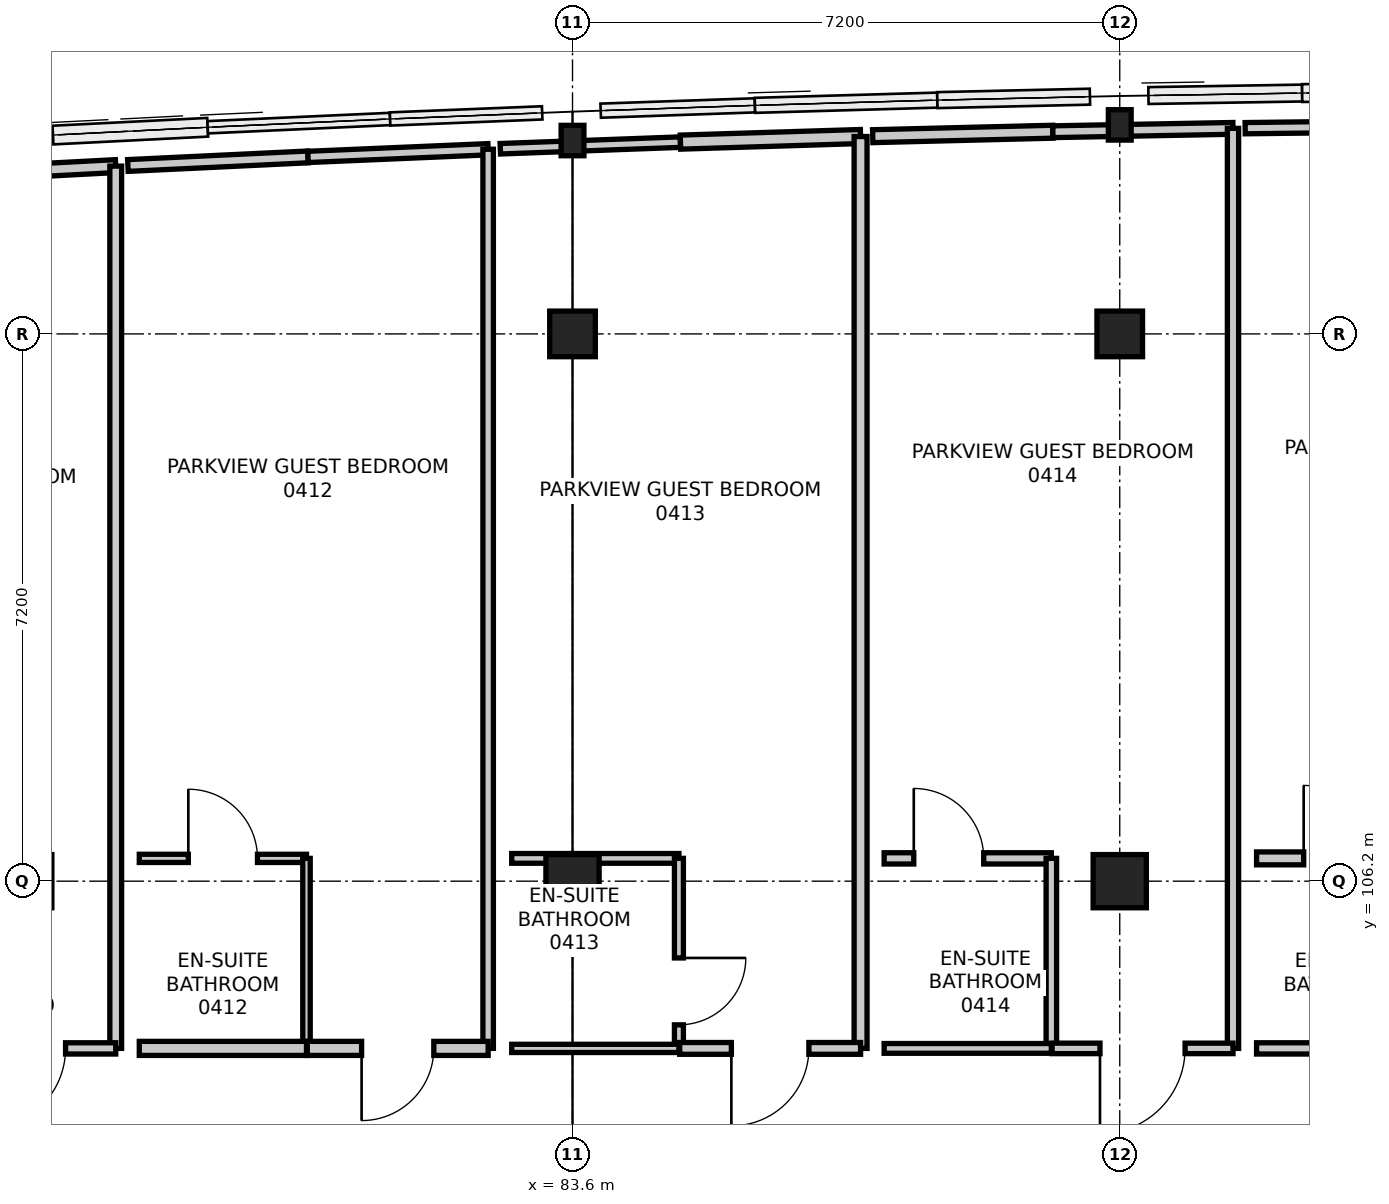
"""IFC4 building model, lengths in metres.
Left out: names, types, materials, properties, quantities, classifications, styles, units other than length and angle.
Written with IfcOpenShell. Run it as: python <this file> out.ifc"""

import sys

from ifc_helpers import new_model, si_unit, direction, frame, frame_2d, origin, origin_2d, place, context, subcontext, project, spatial, rectangle, i_section, extrude, element, fill, save


model = new_model("IFC4")
c1 = context("Model", 3, precision=1e-05, world=origin(), true_north=direction((0.0, 1.0)))
c2 = subcontext(c1, "Body", "Model", "MODEL_VIEW")
j1 = project(units=[si_unit("LENGTHUNIT", "METRE"), si_unit("PLANEANGLEUNIT", "RADIAN")], contexts=[c1])
p1 = place(None, origin())
s1 = spatial("IfcSite", under=j1, at=p1, CompositionType="ELEMENT")
p2 = place(p1, origin())
s2 = spatial("IfcBuilding", under=s1, at=p2, CompositionType="ELEMENT")
p3 = place(p2, frame((0.0, 0.0, 19.2)))
s3 = spatial("IfcBuildingStorey", under=s2, at=p3, CompositionType="ELEMENT", Elevation=19.2)
p4 = place(p3, frame((83.6, 106.2, 0.0), z_axis=(0.0, 0.0, 1.0), x_axis=(1.0, 0.0, 0.0)))
e1 = element("IfcColumn", 1, at=p4, inside=s3, PredefinedType="COLUMN", context=c2, shape_type="SweptSolid", body=[
    extrude(rectangle(XDim=0.7, YDim=0.7, at=origin_2d()), origin(), (0.0, 0.0, 1.0), 3.6),
])
p5 = place(p3, frame((83.6, 113.4, 0.0), z_axis=(0.0, 0.0, 1.0), x_axis=(1.0, 0.0, 0.0)))
e2 = element("IfcColumn", 2, at=p5, inside=s3, PredefinedType="COLUMN", context=c2, shape_type="SweptSolid", body=[
    extrude(rectangle(XDim=0.6, YDim=0.6, at=origin_2d()), origin(), (0.0, 0.0, 1.0), 3.6),
])
p6 = place(p3, frame((83.6, 115.944, 0.0), z_axis=(0.0, 0.0, 1.0), x_axis=(1.0, 0.0, 0.0)))
e3 = element("IfcColumn", 3, at=p6, inside=s3, PredefinedType="COLUMN", context=c2, shape_type="SweptSolid", body=[
    extrude(i_section(OverallWidth=0.3, OverallDepth=0.4, WebThickness=0.013, FlangeThickness=0.024, FilletRadius=0.027, at=origin_2d()), origin(), (0.0, 0.0, 1.0), 3.6),
])
p7 = place(p3, frame((90.8, 106.2, 0.0), z_axis=(0.0, 0.0, 1.0), x_axis=(1.0, 0.0, 0.0)))
e4 = element("IfcColumn", 4, at=p7, inside=s3, PredefinedType="COLUMN", context=c2, shape_type="SweptSolid", body=[
    extrude(rectangle(XDim=0.7, YDim=0.7, at=origin_2d()), origin(), (0.0, 0.0, 1.0), 3.6),
])
p8 = place(p3, frame((90.8, 113.4, 0.0), z_axis=(0.0, 0.0, 1.0), x_axis=(1.0, 0.0, 0.0)))
e5 = element("IfcColumn", 5, at=p8, inside=s3, PredefinedType="COLUMN", context=c2, shape_type="SweptSolid", body=[
    extrude(rectangle(XDim=0.6, YDim=0.6, at=origin_2d()), origin(), (0.0, 0.0, 1.0), 3.6),
])
p9 = place(p3, frame((90.8, 116.15, 0.0), z_axis=(0.0, 0.0, 1.0), x_axis=(1.0, 0.0, 0.0)))
e6 = element("IfcColumn", 6, at=p9, inside=s3, PredefinedType="COLUMN", context=c2, shape_type="SweptSolid", body=[
    extrude(i_section(OverallWidth=0.3, OverallDepth=0.4, WebThickness=0.013, FlangeThickness=0.024, FilletRadius=0.027, at=origin_2d()), origin(), (0.0, 0.0, 1.0), 3.6),
])
p10 = place(p3, frame((75.22, 115.483, 0.0), z_axis=(0.0, 0.0, 1.0), x_axis=(0.998622939487, 0.052461650097, 0.0)))
e7 = element("IfcWall", 7, at=p10, inside=s3, PredefinedType="PARTITIONING", context=c2, shape_type="SweptSolid", body=[
    extrude(rectangle(XDim=2.373, YDim=0.17, at=frame_2d((1.187, 0.0))), origin(), (0.0, 0.0, 1.0), 2.926),
])
p11 = place(p3, frame((77.59, 115.607, 0.0), z_axis=(0.0, 0.0, 1.0), x_axis=(0.0, -1.0, 0.0)))
e8 = element("IfcWall", 8, at=p11, inside=s3, PredefinedType="PARTITIONING", context=c2, shape_type="SweptSolid", body=[
    extrude(rectangle(XDim=11.607, YDim=0.155, at=frame_2d((5.804, 0.0))), origin(), (0.0, 0.0, 1.0), 2.735),
])
p12 = place(p3, frame((77.59, 104.0, 0.0), z_axis=(0.0, 0.0, 1.0), x_axis=(-1.0, 0.0, 0.0)))
e9 = element("IfcWall", 9, at=p12, inside=s3, PredefinedType="PARTITIONING", context=c2, shape_type="SweptSolid", body=[
    extrude(rectangle(XDim=2.38, YDim=0.148, at=frame_2d((1.19, 0.0))), origin(), (0.0, 0.0, 1.0), 2.685),
])
p13 = place(p12, frame((0.66, 0.0, 0.0)))
e10 = element("IfcOpeningElement", 10, at=p13, cuts=e9, PredefinedType="OPENING", context=c2, shape_type="SweptSolid", body=[
    extrude(rectangle(XDim=1.06, YDim=2.2, at=frame_2d((0.53, 1.1))), frame((0.0, 0.084, 0.0), z_axis=(0.0, -1.0, 0.0), x_axis=(1.0, 0.0, 0.0)), (0.0, 0.0, 1.0), 0.168),
])
p14 = place(p3, frame((77.9, 106.5, 0.0), z_axis=(0.0, 0.0, 1.0), x_axis=(1.0, 0.0, 0.0)))
e11 = element("IfcWall", 11, at=p14, inside=s3, PredefinedType="PARTITIONING", context=c2, shape_type="SweptSolid", body=[
    extrude(rectangle(XDim=2.2, YDim=0.108, at=frame_2d((1.1, 0.0))), origin(), (0.0, 0.0, 1.0), 3.35),
])
p15 = place(p14, frame((0.645, 0.0, 0.0)))
e12 = element("IfcOpeningElement", 12, at=p15, cuts=e11, PredefinedType="OPENING", context=c2, shape_type="SweptSolid", body=[
    extrude(rectangle(XDim=0.91, YDim=2.11, at=frame_2d((0.455, 1.055))), frame((0.0, 0.064, 0.0), z_axis=(0.0, -1.0, 0.0), x_axis=(1.0, 0.0, 0.0)), (0.0, 0.0, 1.0), 0.128),
])
p16 = place(p3, frame((80.1, 106.5, 0.0), z_axis=(0.0, 0.0, 1.0), x_axis=(0.0, -1.0, 0.0)))
e13 = element("IfcWall", 13, at=p16, inside=s3, PredefinedType="PARTITIONING", context=c2, shape_type="SweptSolid", body=[
    extrude(rectangle(XDim=2.5, YDim=0.098, at=frame_2d((1.25, 0.0))), origin(), (0.0, 0.0, 1.0), 2.735),
])
p17 = place(p3, frame((80.1, 104.0, 0.0), z_axis=(0.0, 0.0, 1.0), x_axis=(-1.0, 0.0, 0.0)))
e14 = element("IfcWall", 14, at=p17, inside=s3, PredefinedType="PARTITIONING", context=c2, shape_type="SweptSolid", body=[
    extrude(rectangle(XDim=2.2, YDim=0.185, at=frame_2d((1.1, 0.0))), origin(), (0.0, 0.0, 1.0), 3.35),
])
p18 = place(p3, frame((77.75, 115.615, 0.0), z_axis=(0.0, 0.0, 1.0), x_axis=(0.998864643261, 0.047638476497, 0.0)))
e15 = element("IfcWall", 15, at=p18, inside=s3, PredefinedType="PARTITIONING", context=c2, shape_type="SweptSolid", body=[
    extrude(rectangle(XDim=2.373, YDim=0.155, at=frame_2d((1.187, 0.0))), origin(), (0.0, 0.0, 1.0), 2.926),
])
p19 = place(p3, frame((80.12, 115.729, 0.0), z_axis=(0.0, 0.0, 1.0), x_axis=(0.999096119718, 0.042508158797, 0.0)))
e16 = element("IfcWall", 16, at=p19, inside=s3, PredefinedType="PARTITIONING", context=c2, shape_type="SweptSolid", body=[
    extrude(rectangle(XDim=2.372, YDim=0.148, at=frame_2d((1.186, 0.0))), origin(), (0.0, 0.0, 1.0), 2.926),
])
p20 = place(p3, frame((82.49, 115.829, 0.0), z_axis=(0.0, 0.0, 1.0), x_axis=(0.0, -1.0, 0.0)))
e17 = element("IfcWall", 17, at=p20, inside=s3, PredefinedType="PARTITIONING", context=c2, shape_type="SweptSolid", body=[
    extrude(rectangle(XDim=11.829, YDim=0.138, at=frame_2d((5.915, 0.0))), origin(), (0.0, 0.0, 1.0), 2.735),
])
p21 = place(p3, frame((82.49, 104.0, 0.0), z_axis=(0.0, 0.0, 1.0), x_axis=(-1.0, 0.0, 0.0)))
e18 = element("IfcWall", 18, at=p21, inside=s3, PredefinedType="PARTITIONING", context=c2, shape_type="SweptSolid", body=[
    extrude(rectangle(XDim=2.38, YDim=0.185, at=frame_2d((1.19, 0.0))), origin(), (0.0, 0.0, 1.0), 3.35),
])
p22 = place(p21, frame((0.715, 0.0, 0.0)))
e19 = element("IfcOpeningElement", 19, at=p22, cuts=e18, PredefinedType="OPENING", context=c2, shape_type="SweptSolid", body=[
    extrude(rectangle(XDim=0.95, YDim=2.1, at=frame_2d((0.475, 1.05))), frame((0.0, 0.103, 0.0), z_axis=(0.0, -1.0, 0.0), x_axis=(1.0, 0.0, 0.0)), (0.0, 0.0, 1.0), 0.205),
])
p23 = place(p3, frame((82.8, 106.5, 0.0), z_axis=(0.0, 0.0, 1.0), x_axis=(1.0, 0.0, 0.0)))
e20 = element("IfcWall", 20, at=p23, inside=s3, PredefinedType="PARTITIONING", context=c2, shape_type="SweptSolid", body=[
    extrude(rectangle(XDim=2.2, YDim=0.128, at=frame_2d((1.1, 0.0))), origin(), (0.0, 0.0, 1.0), 2.685),
])
p24 = place(p3, frame((85.0, 106.5, 0.0), z_axis=(0.0, 0.0, 1.0), x_axis=(0.0, -1.0, 0.0)))
e21 = element("IfcWall", 21, at=p24, inside=s3, PredefinedType="PARTITIONING", context=c2, shape_type="SweptSolid", body=[
    extrude(rectangle(XDim=2.5, YDim=0.118, at=frame_2d((1.25, 0.0))), origin(), (0.0, 0.0, 1.0), 2.735),
])
p25 = place(p24, frame((1.31, 0.0, 0.0)))
e22 = element("IfcOpeningElement", 22, at=p25, cuts=e21, PredefinedType="OPENING", context=c2, shape_type="SweptSolid", body=[
    extrude(rectangle(XDim=0.88, YDim=2.06, at=frame_2d((0.44, 1.03))), frame((0.0, 0.069, 0.0), z_axis=(0.0, -1.0, 0.0), x_axis=(1.0, 0.0, 0.0)), (0.0, 0.0, 1.0), 0.138),
])
p26 = place(p3, frame((85.0, 104.0, 0.0), z_axis=(0.0, 0.0, 1.0), x_axis=(-1.0, 0.0, 0.0)))
e23 = element("IfcWall", 23, at=p26, inside=s3, PredefinedType="PARTITIONING", context=c2, shape_type="SweptSolid", body=[
    extrude(rectangle(XDim=2.2, YDim=0.108, at=frame_2d((1.1, 0.0))), origin(), (0.0, 0.0, 1.0), 2.685),
])
p27 = place(p3, frame((82.65, 115.836, 0.0), z_axis=(0.0, 0.0, 1.0), x_axis=(0.999324529016, 0.036748955177, 0.0)))
e24 = element("IfcWall", 24, at=p27, inside=s3, PredefinedType="PARTITIONING", context=c2, shape_type="SweptSolid", body=[
    extrude(rectangle(XDim=2.372, YDim=0.138, at=frame_2d((1.186, 0.0))), origin(), (0.0, 0.0, 1.0), 2.926),
])
p28 = place(p3, frame((85.02, 115.923, 0.0), z_axis=(0.0, 0.0, 1.0), x_axis=(0.999516386188, 0.031096522986, 0.0)))
e25 = element("IfcWall", 25, at=p28, inside=s3, PredefinedType="PARTITIONING", context=c2, shape_type="SweptSolid", body=[
    extrude(rectangle(XDim=2.371, YDim=0.185, at=frame_2d((1.186, 0.0))), origin(), (0.0, 0.0, 1.0), 2.926),
])
p29 = place(p3, frame((87.39, 115.997, 0.0), z_axis=(0.0, 0.0, 1.0), x_axis=(0.0, -1.0, 0.0)))
e26 = element("IfcWall", 26, at=p29, inside=s3, PredefinedType="PARTITIONING", context=c2, shape_type="SweptSolid", body=[
    extrude(rectangle(XDim=11.997, YDim=0.17, at=frame_2d((5.999, 0.0))), origin(), (0.0, 0.0, 1.0), 2.735),
])
p30 = place(p3, frame((87.39, 104.0, 0.0), z_axis=(0.0, 0.0, 1.0), x_axis=(-1.0, 0.0, 0.0)))
e27 = element("IfcWall", 27, at=p30, inside=s3, PredefinedType="PARTITIONING", context=c2, shape_type="SweptSolid", body=[
    extrude(rectangle(XDim=2.38, YDim=0.155, at=frame_2d((1.19, 0.0))), origin(), (0.0, 0.0, 1.0), 3.35),
])
p31 = place(p30, frame((0.68, 0.0, 0.0)))
e28 = element("IfcOpeningElement", 28, at=p31, cuts=e27, PredefinedType="OPENING", context=c2, shape_type="SweptSolid", body=[
    extrude(rectangle(XDim=1.02, YDim=2.15, at=frame_2d((0.51, 1.075))), frame((0.0, 0.087, 0.0), z_axis=(0.0, -1.0, 0.0), x_axis=(1.0, 0.0, 0.0)), (0.0, 0.0, 1.0), 0.175),
])
p32 = place(p3, frame((87.7, 106.5, 0.0), z_axis=(0.0, 0.0, 1.0), x_axis=(1.0, 0.0, 0.0)))
e29 = element("IfcWall", 29, at=p32, inside=s3, PredefinedType="PARTITIONING", context=c2, shape_type="SweptSolid", body=[
    extrude(rectangle(XDim=2.2, YDim=0.148, at=frame_2d((1.1, 0.0))), origin(), (0.0, 0.0, 1.0), 3.35),
])
p33 = place(p32, frame((0.39, 0.0, 0.0)))
e30 = element("IfcOpeningElement", 30, at=p33, cuts=e29, PredefinedType="OPENING", context=c2, shape_type="SweptSolid", body=[
    extrude(rectangle(XDim=0.92, YDim=2.1, at=frame_2d((0.46, 1.05))), frame((0.0, 0.084, 0.0), z_axis=(0.0, -1.0, 0.0), x_axis=(1.0, 0.0, 0.0)), (0.0, 0.0, 1.0), 0.168),
])
p34 = place(p3, frame((89.9, 106.5, 0.0), z_axis=(0.0, 0.0, 1.0), x_axis=(0.0, -1.0, 0.0)))
e31 = element("IfcWall", 31, at=p34, inside=s3, PredefinedType="PARTITIONING", context=c2, shape_type="SweptSolid", body=[
    extrude(rectangle(XDim=2.5, YDim=0.138, at=frame_2d((1.25, 0.0))), origin(), (0.0, 0.0, 1.0), 2.735),
])
p35 = place(p3, frame((89.9, 104.0, 0.0), z_axis=(0.0, 0.0, 1.0), x_axis=(-1.0, 0.0, 0.0)))
e32 = element("IfcWall", 32, at=p35, inside=s3, PredefinedType="PARTITIONING", context=c2, shape_type="SweptSolid", body=[
    extrude(rectangle(XDim=2.2, YDim=0.128, at=frame_2d((1.1, 0.0))), origin(), (0.0, 0.0, 1.0), 3.35),
])
p36 = place(p3, frame((87.55, 116.001, 0.0), z_axis=(0.0, 0.0, 1.0), x_axis=(0.999694491448, 0.024716872149, 0.0)))
e33 = element("IfcWall", 33, at=p36, inside=s3, PredefinedType="PARTITIONING", context=c2, shape_type="SweptSolid", body=[
    extrude(rectangle(XDim=2.371, YDim=0.17, at=frame_2d((1.185, 0.0))), origin(), (0.0, 0.0, 1.0), 2.926),
])
p37 = place(p3, frame((89.92, 116.06, 0.0), z_axis=(0.0, 0.0, 1.0), x_axis=(0.999826238158, 0.018641177287, 0.0)))
e34 = element("IfcWall", 34, at=p37, inside=s3, PredefinedType="PARTITIONING", context=c2, shape_type="SweptSolid", body=[
    extrude(rectangle(XDim=2.371, YDim=0.155, at=frame_2d((1.185, 0.0))), origin(), (0.0, 0.0, 1.0), 2.926),
])
p38 = place(p3, frame((92.29, 116.104, 0.0), z_axis=(0.0, 0.0, 1.0), x_axis=(0.0, -1.0, 0.0)))
e35 = element("IfcWall", 35, at=p38, inside=s3, PredefinedType="PARTITIONING", context=c2, shape_type="SweptSolid", body=[
    extrude(rectangle(XDim=12.104, YDim=0.148, at=frame_2d((6.052, 0.0))), origin(), (0.0, 0.0, 1.0), 2.735),
])
p39 = place(p3, frame((92.29, 104.0, 0.0), z_axis=(0.0, 0.0, 1.0), x_axis=(-1.0, 0.0, 0.0)))
e36 = element("IfcWall", 36, at=p39, inside=s3, PredefinedType="PARTITIONING", context=c2, shape_type="SweptSolid", body=[
    extrude(rectangle(XDim=2.38, YDim=0.138, at=frame_2d((1.19, 0.0))), origin(), (0.0, 0.0, 1.0), 2.685),
])
p40 = place(p39, frame((0.63, 0.0, 0.0)))
e37 = element("IfcOpeningElement", 37, at=p40, cuts=e36, PredefinedType="OPENING", context=c2, shape_type="SweptSolid", body=[
    extrude(rectangle(XDim=1.12, YDim=2.2, at=frame_2d((0.56, 1.1))), frame((0.0, 0.079, 0.0), z_axis=(0.0, -1.0, 0.0), x_axis=(1.0, 0.0, 0.0)), (0.0, 0.0, 1.0), 0.158),
])
p41 = place(p3, frame((92.6, 106.5, 0.0), z_axis=(0.0, 0.0, 1.0), x_axis=(1.0, 0.0, 0.0)))
e38 = element("IfcWall", 38, at=p41, inside=s3, PredefinedType="PARTITIONING", context=c2, shape_type="SweptSolid", body=[
    extrude(rectangle(XDim=2.2, YDim=0.17, at=frame_2d((1.1, 0.0))), origin(), (0.0, 0.0, 1.0), 2.735),
])
p42 = place(p41, frame((0.62, 0.0, 0.0)))
e39 = element("IfcOpeningElement", 39, at=p42, cuts=e38, PredefinedType="OPENING", context=c2, shape_type="SweptSolid", body=[
    extrude(rectangle(XDim=0.96, YDim=2.14, at=frame_2d((0.48, 1.07))), frame((0.0, 0.095, 0.0), z_axis=(0.0, -1.0, 0.0), x_axis=(1.0, 0.0, 0.0)), (0.0, 0.0, 1.0), 0.19),
])
p43 = place(p3, frame((94.8, 104.0, 0.0), z_axis=(0.0, 0.0, 1.0), x_axis=(-1.0, 0.0, 0.0)))
e40 = element("IfcWall", 40, at=p43, inside=s3, PredefinedType="PARTITIONING", context=c2, shape_type="SweptSolid", body=[
    extrude(rectangle(XDim=2.2, YDim=0.148, at=frame_2d((1.1, 0.0))), origin(), (0.0, 0.0, 1.0), 3.35),
])
p44 = place(p3, frame((92.45, 116.106, 0.0), z_axis=(0.0, 0.0, 1.0), x_axis=(0.999929844707, 0.011845069236, 0.0)))
e41 = element("IfcWall", 41, at=p44, inside=s3, PredefinedType="PARTITIONING", context=c2, shape_type="SweptSolid", body=[
    extrude(rectangle(XDim=2.37, YDim=0.148, at=frame_2d((1.185, 0.0))), origin(), (0.0, 0.0, 1.0), 2.926),
])
p45 = place(p13, origin())
e42 = element("IfcDoor", 42, at=p45, inside=s3, OperationType="SINGLE_SWING_RIGHT", PredefinedType="DOOR", context=c2, shape_type="SweptSolid", body=[
    extrude(rectangle(XDim=1.06, YDim=2.2, at=frame_2d((0.53, 1.1))), frame((0.0, 0.025, 0.0), z_axis=(0.0, -1.0, 0.0), x_axis=(1.0, 0.0, 0.0)), (0.0, 0.0, 1.0), 0.05),
])
fill(e10, e42)
p46 = place(p15, origin())
e43 = element("IfcDoor", 43, at=p46, inside=s3, OperationType="SINGLE_SWING_LEFT", PredefinedType="DOOR", context=c2, shape_type="SweptSolid", body=[
    extrude(rectangle(XDim=0.91, YDim=2.11, at=frame_2d((0.455, 1.055))), frame((0.0, 0.025, 0.0), z_axis=(0.0, -1.0, 0.0), x_axis=(1.0, 0.0, 0.0)), (0.0, 0.0, 1.0), 0.05),
])
fill(e12, e43)
p47 = place(p22, origin())
e44 = element("IfcDoor", 44, at=p47, inside=s3, OperationType="SINGLE_SWING_RIGHT", PredefinedType="DOOR", context=c2, shape_type="SweptSolid", body=[
    extrude(rectangle(XDim=0.95, YDim=2.1, at=frame_2d((0.475, 1.05))), frame((0.0, 0.025, 0.0), z_axis=(0.0, -1.0, 0.0), x_axis=(1.0, 0.0, 0.0)), (0.0, 0.0, 1.0), 0.05),
])
fill(e19, e44)
p48 = place(p25, origin())
e45 = element("IfcDoor", 45, at=p48, inside=s3, OperationType="SINGLE_SWING_LEFT", PredefinedType="DOOR", context=c2, shape_type="SweptSolid", body=[
    extrude(rectangle(XDim=0.88, YDim=2.06, at=frame_2d((0.44, 1.03))), frame((0.0, 0.025, 0.0), z_axis=(0.0, -1.0, 0.0), x_axis=(1.0, 0.0, 0.0)), (0.0, 0.0, 1.0), 0.05),
])
fill(e22, e45)
p49 = place(p31, origin())
e46 = element("IfcDoor", 46, at=p49, inside=s3, OperationType="SINGLE_SWING_RIGHT", PredefinedType="DOOR", context=c2, shape_type="SweptSolid", body=[
    extrude(rectangle(XDim=1.02, YDim=2.15, at=frame_2d((0.51, 1.075))), frame((0.0, 0.025, 0.0), z_axis=(0.0, -1.0, 0.0), x_axis=(1.0, 0.0, 0.0)), (0.0, 0.0, 1.0), 0.05),
])
fill(e28, e46)
p50 = place(p33, origin())
e47 = element("IfcDoor", 47, at=p50, inside=s3, OperationType="SINGLE_SWING_LEFT", PredefinedType="DOOR", context=c2, shape_type="SweptSolid", body=[
    extrude(rectangle(XDim=0.92, YDim=2.1, at=frame_2d((0.46, 1.05))), frame((0.0, 0.025, 0.0), z_axis=(0.0, -1.0, 0.0), x_axis=(1.0, 0.0, 0.0)), (0.0, 0.0, 1.0), 0.05),
])
fill(e30, e47)
p51 = place(p40, origin())
e48 = element("IfcDoor", 48, at=p51, inside=s3, OperationType="SINGLE_SWING_RIGHT", PredefinedType="DOOR", context=c2, shape_type="SweptSolid", body=[
    extrude(rectangle(XDim=1.12, YDim=2.2, at=frame_2d((0.56, 1.1))), frame((0.0, 0.025, 0.0), z_axis=(0.0, -1.0, 0.0), x_axis=(1.0, 0.0, 0.0)), (0.0, 0.0, 1.0), 0.05),
])
fill(e37, e48)
p52 = place(p42, origin())
e49 = element("IfcDoor", 49, at=p52, inside=s3, OperationType="SINGLE_SWING_LEFT", PredefinedType="DOOR", context=c2, shape_type="SweptSolid", body=[
    extrude(rectangle(XDim=0.96, YDim=2.14, at=frame_2d((0.48, 1.07))), frame((0.0, 0.025, 0.0), z_axis=(0.0, -1.0, 0.0), x_axis=(1.0, 0.0, 0.0)), (0.0, 0.0, 1.0), 0.05),
])
fill(e39, e49)
save(model, sys.argv[1])
